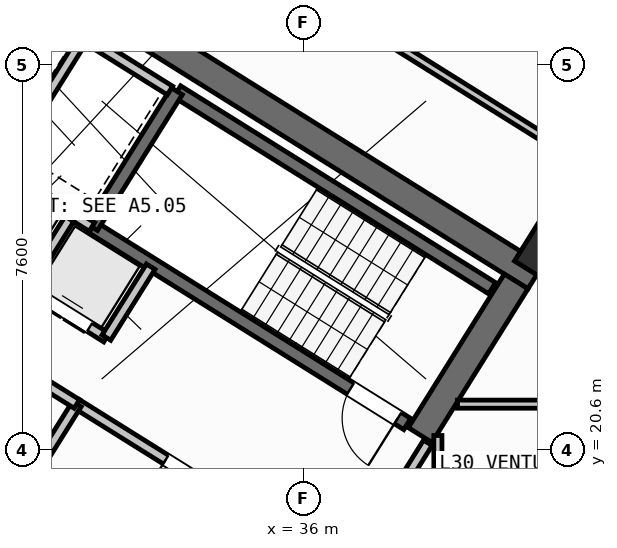
"""IFC4 building model, lengths in metres.
Left out: names, types, materials, properties, quantities, classifications, styles, units other than length and angle.
Written with IfcOpenShell. Run it as: python <this file> out.ifc"""

import sys

from ifc_helpers import new_model, si_unit, direction, frame, frame_2d, origin, origin_2d, place, context, subcontext, project, spatial, rectangle, hollow_rectangle, extrude, source, transform, mapped, element, fill, save


model = new_model("IFC4")
c1 = context("Model", 3, precision=1e-05, world=origin(), true_north=direction((0.0, 1.0)))
c2 = subcontext(c1, "Body", "Model", "MODEL_VIEW")
j1 = project(units=[si_unit("LENGTHUNIT", "METRE"), si_unit("PLANEANGLEUNIT", "RADIAN")], contexts=[c1])
p1 = place(None, origin())
s1 = spatial("IfcSite", under=j1, at=p1, CompositionType="ELEMENT")
p2 = place(p1, origin())
s2 = spatial("IfcBuilding", under=s1, at=p2, CompositionType="ELEMENT")
p3 = place(p2, frame((0.0, 0.0, 119.7)))
s3 = spatial("IfcBuildingStorey", under=s2, at=p3, CompositionType="ELEMENT", Elevation=119.7)
p4 = place(p3, frame((40.573, 24.01, 0.0), z_axis=(0.0, 0.0, 1.0), x_axis=(-0.848047359947, 0.529920442413, 0.0)))
e1 = element("IfcWall", 1, at=p4, inside=s3, PredefinedType="SHEAR", context=c2, shape_type="SweptSolid", body=[
    extrude(rectangle(XDim=13.14, YDim=0.55, at=frame_2d((6.57, 0.0))), origin(), (0.0, 0.0, 1.0), 3.35),
])
p5 = place(p3, frame((40.194, 23.922, 0.0), z_axis=(0.0, 0.0, 1.0), x_axis=(-0.529888438328, -0.848067357541, 0.0)))
e2 = element("IfcWall", 2, at=p5, inside=s3, PredefinedType="SHEAR", context=c2, shape_type="SweptSolid", body=[
    extrude(rectangle(XDim=3.575, YDim=0.55, at=frame_2d((1.788, 0.0))), origin(), (0.0, 0.0, 1.0), 3.35),
])
m1 = source(origin(), c2, "Body", "SweptSolid", [
    extrude(hollow_rectangle(XDim=0.9, YDim=0.9, WallThickness=0.036, at=origin_2d()), origin(), (0.0, 0.0, 1.0), 3.6),
])
p6 = place(p3, frame((40.783, 24.469, 0.0), z_axis=(0.0, 0.0, 1.0), x_axis=(-0.848048096156, 0.529919264233, 0.0)))
e3 = element("IfcColumn", 3, at=p6, inside=s3, PredefinedType="COLUMN", context=c2, shape_type="MappedRepresentation", body=[
    mapped(m1, transform((0.0, 0.0, 0.0), scale=1.0)),
])
p7 = place(p3, frame((31.76, 12.183, 0.0), z_axis=(0.0, 0.0, 1.0), x_axis=(-0.848047074256, 0.529920899612, 0.0)))
e4 = element("IfcWall", 4, at=p7, inside=s3, PredefinedType="STANDARD", context=c2, shape_type="SweptSolid", body=[
    extrude(rectangle(XDim=30.652, YDim=0.32, at=frame_2d((15.326, 0.0))), origin(), (0.0, 0.0, 1.0), 3.35),
])
p8 = place(p7, frame((15.153, 0.0, 0.0)))
e5 = element("IfcOpeningElement", 5, at=p8, cuts=e4, PredefinedType="OPENING", context=c2, shape_type="SweptSolid", body=[
    extrude(rectangle(XDim=1.2, YDim=2.15, at=frame_2d((0.6, 1.075))), frame((0.0, 0.17, 0.0), z_axis=(0.0, -1.0, 0.0), x_axis=(1.0, 0.0, 0.0)), (0.0, 0.0, 1.0), 0.34),
])
p9 = place(p7, frame((2.002, 0.0, 0.8)))
e6 = element("IfcOpeningElement", 6, at=p9, cuts=e4, PredefinedType="OPENING", context=c2, shape_type="SweptSolid", body=[
    extrude(rectangle(XDim=2.1, YDim=1.55, at=frame_2d((1.05, 0.775))), frame((0.0, 0.17, 0.0), z_axis=(0.0, -1.0, 0.0), x_axis=(1.0, 0.0, 0.0)), (0.0, 0.0, 1.0), 0.34),
])
p10 = place(p7, frame((7.206, 0.0, 0.8)))
e7 = element("IfcOpeningElement", 7, at=p10, cuts=e4, PredefinedType="OPENING", context=c2, shape_type="SweptSolid", body=[
    extrude(rectangle(XDim=2.1, YDim=1.55, at=frame_2d((1.05, 0.775))), frame((0.0, 0.17, 0.0), z_axis=(0.0, -1.0, 0.0), x_axis=(1.0, 0.0, 0.0)), (0.0, 0.0, 1.0), 0.34),
])
p11 = place(p7, frame((12.648, 0.0, 1.0)))
e8 = element("IfcOpeningElement", 8, at=p11, cuts=e4, PredefinedType="OPENING", context=c2, shape_type="SweptSolid", body=[
    extrude(rectangle(XDim=0.9, YDim=1.25, at=frame_2d((0.45, 0.625))), frame((0.0, 0.17, 0.0), z_axis=(0.0, -1.0, 0.0), x_axis=(1.0, 0.0, 0.0)), (0.0, 0.0, 1.0), 0.34),
])
p12 = place(p7, frame((19.458, 0.0, 0.95)))
e9 = element("IfcOpeningElement", 9, at=p12, cuts=e4, PredefinedType="OPENING", context=c2, shape_type="SweptSolid", body=[
    extrude(rectangle(XDim=1.2, YDim=1.4, at=frame_2d((0.6, 0.7))), frame((0.0, 0.17, 0.0), z_axis=(0.0, -1.0, 0.0), x_axis=(1.0, 0.0, 0.0)), (0.0, 0.0, 1.0), 0.34),
])
p13 = place(p7, frame((21.858, 0.0, 0.95)))
e10 = element("IfcOpeningElement", 10, at=p13, cuts=e4, PredefinedType="OPENING", context=c2, shape_type="SweptSolid", body=[
    extrude(rectangle(XDim=1.2, YDim=1.4, at=frame_2d((0.6, 0.7))), frame((0.0, 0.17, 0.0), z_axis=(0.0, -1.0, 0.0), x_axis=(1.0, 0.0, 0.0)), (0.0, 0.0, 1.0), 0.34),
])
p14 = place(p7, frame((27.266, 0.0, 0.8)))
e11 = element("IfcOpeningElement", 11, at=p14, cuts=e4, PredefinedType="OPENING", context=c2, shape_type="SweptSolid", body=[
    extrude(rectangle(XDim=2.1, YDim=1.55, at=frame_2d((1.05, 0.775))), frame((0.0, 0.17, 0.0), z_axis=(0.0, -1.0, 0.0), x_axis=(1.0, 0.0, 0.0)), (0.0, 0.0, 1.0), 0.34),
])
p15 = place(p3, frame((31.28, 18.261, 0.0), z_axis=(0.0, 0.0, 1.0), x_axis=(-0.848051618787, 0.529913626805, 0.0)))
e12 = element("IfcWall", 12, at=p15, inside=s3, PredefinedType="SHEAR", context=c2, shape_type="SweptSolid", body=[
    extrude(rectangle(XDim=7.46, YDim=0.26, at=frame_2d((3.73, 0.0))), origin(), (0.0, 0.0, 1.0), 3.35),
])
p16 = place(p15, frame((0.36, 0.0, 0.0)))
e13 = element("IfcOpeningElement", 13, at=p16, cuts=e12, PredefinedType="OPENING", context=c2, shape_type="SweptSolid", body=[
    extrude(rectangle(XDim=0.86, YDim=2.05, at=frame_2d((0.43, 1.025))), frame((0.0, 0.14, 0.0), z_axis=(0.0, -1.0, 0.0), x_axis=(1.0, 0.0, 0.0)), (0.0, 0.0, 1.0), 0.28),
])
p17 = place(p3, frame((39.721, 23.788, 0.0), z_axis=(0.0, 0.0, 1.0), x_axis=(-0.848054434086, 0.529909121291, 0.0)))
e14 = element("IfcWall", 14, at=p17, inside=s3, PredefinedType="SHEAR", context=c2, shape_type="SweptSolid", body=[
    extrude(rectangle(XDim=7.33, YDim=0.26, at=frame_2d((3.665, 0.0))), origin(), (0.0, 0.0, 1.0), 3.35),
])
p18 = place(p3, frame((38.046, 21.108, 0.0), z_axis=(0.0, 0.0, 1.0), x_axis=(-0.848054434086, 0.529909121291, 0.0)))
e15 = element("IfcWall", 15, at=p18, inside=s3, PredefinedType="SHEAR", context=c2, shape_type="SweptSolid", body=[
    extrude(rectangle(XDim=7.33, YDim=0.26, at=frame_2d((3.665, 0.0))), origin(), (0.0, 0.0, 1.0), 3.35),
])
p19 = place(p18, frame((0.22, 0.0, 0.0)))
e16 = element("IfcOpeningElement", 16, at=p19, cuts=e15, PredefinedType="OPENING", context=c2, shape_type="SweptSolid", body=[
    extrude(rectangle(XDim=1.1, YDim=2.1, at=frame_2d((0.55, 1.05))), frame((0.0, 0.14, 0.0), z_axis=(0.0, -1.0, 0.0), x_axis=(1.0, 0.0, 0.0)), (0.0, 0.0, 1.0), 0.28),
])
p20 = place(p3, frame((33.496, 27.677, 0.0), z_axis=(0.0, 0.0, 1.0), x_axis=(-0.529908658664, -0.84805472316, 0.0)))
e17 = element("IfcWall", 17, at=p20, inside=s3, PredefinedType="SHEAR", context=c2, shape_type="SweptSolid", body=[
    extrude(rectangle(XDim=3.16, YDim=0.26, at=frame_2d((1.58, 0.0))), origin(), (0.0, 0.0, 1.0), 3.35),
])
p21 = place(p3, frame((36.417, 18.447, 0.0), z_axis=(0.0, 0.0, 1.0), x_axis=(-0.848064879198, 0.529892404805, 0.0)))
e18 = element("IfcWall", 18, at=p21, inside=s3, PredefinedType="STANDARD", context=c2, shape_type="SweptSolid", body=[
    extrude(rectangle(XDim=5.768, YDim=0.2, at=frame_2d((2.884, 0.0))), origin(), (0.0, 0.0, 1.0), 3.34),
])
p22 = place(p21, frame((2.548, 0.0, 0.0)))
e19 = element("IfcOpeningElement", 19, at=p22, cuts=e18, PredefinedType="OPENING", context=c2, shape_type="SweptSolid", body=[
    extrude(rectangle(XDim=1.15, YDim=2.1, at=frame_2d((0.575, 1.05))), frame((0.0, 0.11, 0.0), z_axis=(0.0, -1.0, 0.0), x_axis=(1.0, 0.0, 0.0)), (0.0, 0.0, 1.0), 0.22),
])
p23 = place(p3, frame((31.822, 24.998, 0.0), z_axis=(0.0, 0.0, 1.0), x_axis=(-0.848036912365, 0.52993716162, 0.0)))
e20 = element("IfcWall", 20, at=p23, inside=s3, PredefinedType="STANDARD", context=c2, shape_type="SweptSolid", body=[
    extrude(rectangle(XDim=4.618, YDim=0.2, at=frame_2d((2.309, 0.0))), origin(), (0.0, 0.0, 1.0), 3.34),
])
p24 = place(p3, frame((32.108, 22.814, 0.0), z_axis=(0.0, 0.0, 1.0), x_axis=(-0.848042229521, 0.529928652696, 0.0)))
e21 = element("IfcWall", 21, at=p24, inside=s3, PredefinedType="STANDARD", context=c2, shape_type="SweptSolid", body=[
    extrude(rectangle(XDim=5.62, YDim=0.2, at=frame_2d((2.81, 0.0))), origin(), (0.0, 0.0, 1.0), 3.34),
])
p25 = place(p24, frame((0.39, 0.0, 0.0)))
e22 = element("IfcOpeningElement", 22, at=p25, cuts=e21, PredefinedType="OPENING", context=c2, shape_type="SweptSolid", body=[
    extrude(rectangle(XDim=1.1, YDim=2.15, at=frame_2d((0.55, 1.075))), frame((0.0, 0.11, 0.0), z_axis=(0.0, -1.0, 0.0), x_axis=(1.0, 0.0, 0.0)), (0.0, 0.0, 1.0), 0.22),
])
p26 = place(p24, frame((2.25, 0.0, 0.0)))
e23 = element("IfcOpeningElement", 23, at=p26, cuts=e21, PredefinedType="OPENING", context=c2, shape_type="SweptSolid", body=[
    extrude(rectangle(XDim=1.1, YDim=2.15, at=frame_2d((0.55, 1.075))), frame((0.0, 0.11, 0.0), z_axis=(0.0, -1.0, 0.0), x_axis=(1.0, 0.0, 0.0)), (0.0, 0.0, 1.0), 0.22),
])
p27 = place(p24, frame((4.11, 0.0, 0.0)))
e24 = element("IfcOpeningElement", 24, at=p27, cuts=e21, PredefinedType="OPENING", context=c2, shape_type="SweptSolid", body=[
    extrude(rectangle(XDim=1.1, YDim=2.15, at=frame_2d((0.55, 1.075))), frame((0.0, 0.11, 0.0), z_axis=(0.0, -1.0, 0.0), x_axis=(1.0, 0.0, 0.0)), (0.0, 0.0, 1.0), 0.22),
])
p28 = place(p3, frame((32.982, 24.213, 0.0), z_axis=(0.0, 0.0, 1.0), x_axis=(-0.529839334948, -0.84809803628, 0.0)))
e25 = element("IfcWall", 25, at=p28, inside=s3, PredefinedType="STANDARD", context=c2, shape_type="SweptSolid", body=[
    extrude(rectangle(XDim=1.65, YDim=0.2, at=frame_2d((0.825, 0.0))), origin(), (0.0, 0.0, 1.0), 3.34),
])
p29 = place(p3, frame((31.645, 28.716, 0.0), z_axis=(0.0, 0.0, 1.0), x_axis=(-0.52986693015, -0.848080795876, 0.0)))
e26 = element("IfcWall", 26, at=p29, inside=s3, PredefinedType="STANDARD", context=c2, shape_type="SweptSolid", body=[
    extrude(rectangle(XDim=2.66, YDim=0.2, at=frame_2d((1.33, 0.0))), origin(), (0.0, 0.0, 1.0), 3.34),
])
p30 = place(p3, frame((33.363, 27.69, 0.0), z_axis=(0.0, 0.0, 1.0), x_axis=(-0.848047090064, 0.529920874315, 0.0)))
e27 = element("IfcWall", 27, at=p30, inside=s3, PredefinedType="STANDARD", context=c2, shape_type="SweptSolid", body=[
    extrude(rectangle(XDim=4.498, YDim=0.2, at=frame_2d((2.249, 0.0))), origin(), (0.0, 0.0, 1.0), 3.34),
])
p31 = place(p3, frame((31.379, 25.156, 0.0), z_axis=(0.0, 0.0, 1.0), x_axis=(-0.529998940003, -0.847998304005, 0.0)))
e28 = element("IfcWall", 28, at=p31, inside=s3, PredefinedType="STANDARD", context=c2, shape_type="SweptSolid", body=[
    extrude(rectangle(XDim=1.58, YDim=0.2, at=frame_2d((0.79, 0.0))), origin(), (0.0, 0.0, 1.0), 3.34),
])
p32 = place(p3, frame((31.525, 21.504, 0.0), z_axis=(0.0, 0.0, 1.0), x_axis=(-0.529907497854, -0.848055448493, 0.0)))
e29 = element("IfcWall", 29, at=p32, inside=s3, PredefinedType="STANDARD", context=c2, shape_type="SweptSolid", body=[
    extrude(rectangle(XDim=2.88, YDim=0.2, at=frame_2d((1.44, 0.0))), origin(), (0.0, 0.0, 1.0), 3.34),
])
p33 = place(p3, frame((31.525, 21.504, 0.0), z_axis=(0.0, 0.0, 1.0), x_axis=(-0.848040211232, 0.529931882541, 0.0)))
e30 = element("IfcWall", 30, at=p33, inside=s3, PredefinedType="STANDARD", context=c2, shape_type="SweptSolid", body=[
    extrude(rectangle(XDim=6.218, YDim=0.2, at=frame_2d((3.109, 0.0))), origin(), (0.0, 0.0, 1.0), 3.34),
])
p34 = place(p33, frame((4.4, 0.0, 0.0)))
e31 = element("IfcOpeningElement", 31, at=p34, cuts=e30, PredefinedType="OPENING", context=c2, shape_type="SweptSolid", body=[
    extrude(rectangle(XDim=0.86, YDim=2.05, at=frame_2d((0.43, 1.025))), frame((0.0, 0.11, 0.0), z_axis=(0.0, -1.0, 0.0), x_axis=(1.0, 0.0, 0.0)), (0.0, 0.0, 1.0), 0.22),
])
p35 = place(p33, frame((1.45, 0.0, 0.0)))
e32 = element("IfcOpeningElement", 32, at=p35, cuts=e30, PredefinedType="OPENING", context=c2, shape_type="SweptSolid", body=[
    extrude(rectangle(XDim=0.86, YDim=2.05, at=frame_2d((0.43, 1.025))), frame((0.0, 0.11, 0.0), z_axis=(0.0, -1.0, 0.0), x_axis=(1.0, 0.0, 0.0)), (0.0, 0.0, 1.0), 0.22),
])
p36 = place(p3, frame((41.936, 26.012, 0.0), z_axis=(0.0, 0.0, 1.0), x_axis=(-0.848051154596, 0.529914369676, 0.0)))
e33 = element("IfcWall", 33, at=p36, inside=s3, PredefinedType="PARTITIONING", context=c2, shape_type="SweptSolid", body=[
    extrude(rectangle(XDim=15.57, YDim=0.16, at=frame_2d((7.785, 0.0))), origin(), (0.0, 0.0, 1.0), 3.34),
])
p37 = place(p36, frame((10.83, 0.0, 0.0)))
e34 = element("IfcOpeningElement", 34, at=p37, cuts=e33, PredefinedType="OPENING", context=c2, shape_type="SweptSolid", body=[
    extrude(rectangle(XDim=1.0, YDim=2.1, at=frame_2d((0.5, 1.05))), frame((0.0, 0.09, 0.0), z_axis=(0.0, -1.0, 0.0), x_axis=(1.0, 0.0, 0.0)), (0.0, 0.0, 1.0), 0.18),
])
p38 = place(p3, frame((38.451, 20.737, 0.0), z_axis=(0.0, 0.0, 1.0), x_axis=(-0.529924799939, -0.848044637038, 0.0)))
e35 = element("IfcWall", 35, at=p38, inside=s3, PredefinedType="STANDARD", context=c2, shape_type="SweptSolid", body=[
    extrude(rectangle(XDim=2.96, YDim=0.2, at=frame_2d((1.48, 0.0))), origin(), (0.0, 0.0, 1.0), 3.34),
])
p39 = place(p38, frame((1.46, 0.0, 0.0)))
e36 = element("IfcOpeningElement", 36, at=p39, cuts=e35, PredefinedType="OPENING", context=c2, shape_type="SweptSolid", body=[
    extrude(rectangle(XDim=0.86, YDim=2.05, at=frame_2d((0.43, 1.025))), frame((0.0, 0.11, 0.0), z_axis=(0.0, -1.0, 0.0), x_axis=(1.0, 0.0, 0.0)), (0.0, 0.0, 1.0), 0.22),
])
p40 = place(p3, frame((38.65, 17.93, 0.0), z_axis=(0.0, 0.0, 1.0), x_axis=(0.0, 1.0, 0.0)))
e37 = element("IfcWall", 37, at=p40, inside=s3, PredefinedType="PARTITIONING", context=c2, shape_type="SweptSolid", body=[
    extrude(rectangle(XDim=2.951, YDim=0.16, at=frame_2d((1.476, 0.0))), origin(), (0.0, 0.0, 1.0), 3.34),
])
p41 = place(p3, frame((39.037, 21.5, 0.0), z_axis=(0.0, 0.0, 1.0), x_axis=(1.0, 0.0, 0.0)))
e38 = element("IfcWall", 38, at=p41, inside=s3, PredefinedType="PARTITIONING", context=c2, shape_type="SweptSolid", body=[
    extrude(rectangle(XDim=7.215, YDim=0.16, at=frame_2d((3.607, 0.0))), origin(), (0.0, 0.0, 1.0), 3.34),
])
m2 = source(origin(), c2, "Body", "SweptSolid", [
    extrude(rectangle(XDim=1.1, YDim=2.1, at=frame_2d((0.55, 1.05))), frame((0.0, 0.025, 0.0), z_axis=(0.0, -1.0, 0.0), x_axis=(1.0, 0.0, 0.0)), (0.0, 0.0, 1.0), 0.05),
])
p42 = place(p19, origin())
e39 = element("IfcDoor", 39, at=p42, inside=s3, OperationType="SINGLE_SWING_LEFT", PredefinedType="DOOR", context=c2, shape_type="MappedRepresentation", body=[
    mapped(m2, transform((0.0, 0.0, 0.0), scale=1.0)),
])
fill(e16, e39)
m3 = source(origin(), c2, "Body", "SweptSolid", [
    extrude(rectangle(XDim=1.15, YDim=2.1, at=frame_2d((0.575, 1.05))), frame((0.0, 0.025, 0.0), z_axis=(0.0, -1.0, 0.0), x_axis=(1.0, 0.0, 0.0)), (0.0, 0.0, 1.0), 0.05),
])
p43 = place(p22, origin())
e40 = element("IfcDoor", 40, at=p43, inside=s3, OperationType="SINGLE_SWING_RIGHT", PredefinedType="DOOR", context=c2, shape_type="MappedRepresentation", body=[
    mapped(m3, transform((0.0, 0.0, 0.0), scale=1.0)),
])
fill(e19, e40)
m4 = source(origin(), c2, "Body", "SweptSolid", [
    extrude(rectangle(XDim=1.1, YDim=2.15, at=frame_2d((0.55, 1.075))), frame((0.0, 0.025, 0.0), z_axis=(0.0, -1.0, 0.0), x_axis=(1.0, 0.0, 0.0)), (0.0, 0.0, 1.0), 0.05),
])
p44 = place(p25, origin())
e41 = element("IfcDoor", 41, at=p44, inside=s3, OperationType="DOUBLE_DOOR_SLIDING", PredefinedType="DOOR", context=c2, shape_type="MappedRepresentation", body=[
    mapped(m4, transform((0.0, 0.0, 0.0), scale=1.0)),
])
fill(e22, e41)
save(model, sys.argv[1])
